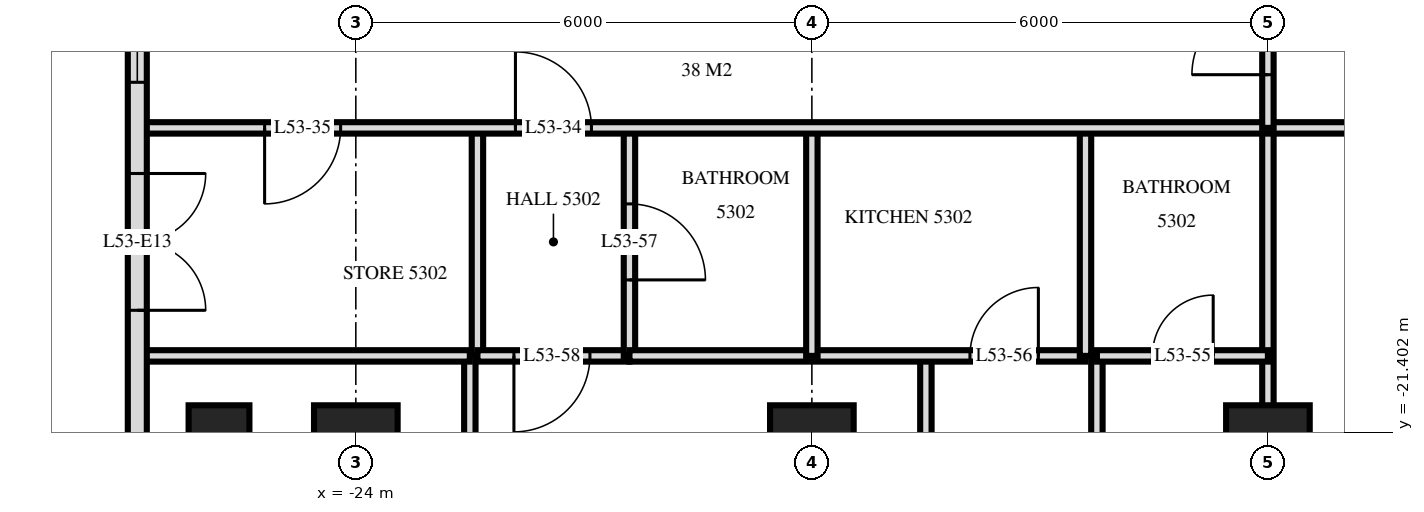
"""IFC4 building model, lengths in metres.
Left out: names, types, materials, properties, quantities, classifications, styles, units other than length and angle.
Written with IfcOpenShell. Run it as: python <this file> out.ifc"""

import sys

from ifc_helpers import new_model, si_unit, direction, frame, frame_2d, origin, origin_2d, place, context, subcontext, project, spatial, rectangle, extrude, element, fill, save


model = new_model("IFC4")
c1 = context("Model", 3, precision=1e-05, world=origin(), true_north=direction((0.0, 1.0)))
c2 = subcontext(c1, "Body", "Model", "MODEL_VIEW")
j1 = project(units=[si_unit("LENGTHUNIT", "METRE"), si_unit("PLANEANGLEUNIT", "RADIAN")], contexts=[c1])
p1 = place(None, origin())
s1 = spatial("IfcSite", under=j1, at=p1, CompositionType="ELEMENT")
p2 = place(p1, origin())
s2 = spatial("IfcBuilding", under=s1, at=p2, CompositionType="ELEMENT")
p3 = place(p2, frame((0.0, 0.0, 204.6)))
s3 = spatial("IfcBuildingStorey", under=s2, at=p3, CompositionType="ELEMENT", Elevation=204.6)
p4 = place(p3, frame((-25.8, -21.6, 0.0), z_axis=(0.0, 0.0, 1.0), x_axis=(0.0, 1.0, 0.0)))
e1 = element("IfcColumn", 1, at=p4, inside=s3, PredefinedType="COLUMN", context=c2, shape_type="SweptSolid", body=[
    extrude(rectangle(XDim=1.1, YDim=0.8, at=origin_2d()), origin(), (0.0, 0.0, 1.0), 3.5),
])
for number, where, z_axis, x_axis in (
    (2, (-24.0, -21.6, 0.0), (0.0, 0.0, 1.0), (1.0, 0.0, 0.0)),
    (3, (-18.0, -21.6, 0.0), (0.0, 0.0, 1.0), (1.0, 0.0, 0.0)),
    (4, (-12.0, -21.6, 0.0), (0.0, 0.0, 1.0), (1.0, 0.0, 0.0)),
):
    element("IfcColumn", number, at=place(p3, frame(where, z_axis=z_axis, x_axis=x_axis)), inside=s3, PredefinedType="COLUMN", context=c2, shape_type="SweptSolid", body=[
        extrude(rectangle(XDim=1.1, YDim=1.1, at=origin_2d()), origin(), (0.0, 0.0, 1.0), 3.5),
    ])
p5 = place(p3, frame((-26.875, -3.325, 0.0), z_axis=(0.0, 0.0, 1.0), x_axis=(0.0, -1.0, 0.0)))
e5 = element("IfcWall", 5, at=p5, inside=s3, PredefinedType="SOLIDWALL", context=c2, shape_type="SweptSolid", body=[
    extrude(rectangle(XDim=21.551, YDim=0.25, at=frame_2d((10.775, 0.0))), origin(), (0.0, 0.0, 1.0), 3.22),
])
p6 = place(p5, frame((6.65, 0.0, 0.0)))
e6 = element("IfcOpeningElement", 6, at=p6, cuts=e5, PredefinedType="OPENING", context=c2, shape_type="SweptSolid", body=[
    extrude(rectangle(XDim=1.8, YDim=2.4, at=frame_2d((0.9, 1.2))), frame((0.0, 0.135, 0.0), z_axis=(0.0, -1.0, 0.0), x_axis=(1.0, 0.0, 0.0)), (0.0, 0.0, 1.0), 0.27),
])
p7 = place(p5, frame((12.275, 0.0, 0.9)))
e7 = element("IfcOpeningElement", 7, at=p7, cuts=e5, PredefinedType="OPENING", context=c2, shape_type="SweptSolid", body=[
    extrude(rectangle(XDim=1.2, YDim=1.5, at=frame_2d((0.6, 0.75))), frame((0.0, 0.135, 0.0), z_axis=(0.0, -1.0, 0.0), x_axis=(1.0, 0.0, 0.0)), (0.0, 0.0, 1.0), 0.27),
])
p8 = place(p5, frame((14.675, 0.0, 0.0)))
e8 = element("IfcOpeningElement", 8, at=p8, cuts=e5, PredefinedType="OPENING", context=c2, shape_type="SweptSolid", body=[
    extrude(rectangle(XDim=1.8, YDim=2.4, at=frame_2d((0.9, 1.2))), frame((0.0, 0.135, 0.0), z_axis=(0.0, -1.0, 0.0), x_axis=(1.0, 0.0, 0.0)), (0.0, 0.0, 1.0), 0.27),
])
p9 = place(p5, frame((18.875, 0.0, 0.0)))
e9 = element("IfcOpeningElement", 9, at=p9, cuts=e5, PredefinedType="OPENING", context=c2, shape_type="SweptSolid", body=[
    extrude(rectangle(XDim=1.8, YDim=2.4, at=frame_2d((0.9, 1.2))), frame((0.0, 0.135, 0.0), z_axis=(0.0, -1.0, 0.0), x_axis=(1.0, 0.0, 0.0)), (0.0, 0.0, 1.0), 0.27),
])
p10 = place(p3, frame((-12.0, -17.4, 0.0), z_axis=(0.0, 0.0, 1.0), x_axis=(0.0, 1.0, 0.0)))
e10 = element("IfcWall", 10, at=p10, inside=s3, PredefinedType="PARTITIONING", context=c2, shape_type="SweptSolid", body=[
    extrude(rectangle(XDim=2.35, YDim=0.15, at=frame_2d((1.175, 0.0))), origin(), (0.0, 0.0, 1.0), 3.22),
])
p11 = place(p10, frame((0.7, 0.0, 0.0)))
e11 = element("IfcOpeningElement", 11, at=p11, cuts=e10, PredefinedType="OPENING", context=c2, shape_type="SweptSolid", body=[
    extrude(rectangle(XDim=1.0, YDim=2.1, at=frame_2d((0.5, 1.05))), frame((0.0, 0.085, 0.0), z_axis=(0.0, -1.0, 0.0), x_axis=(1.0, 0.0, 0.0)), (0.0, 0.0, 1.0), 0.17),
])
p12 = place(p3, frame((-12.0, -29.22, 0.0), z_axis=(0.0, 0.0, 1.0), x_axis=(0.0, 1.0, 0.0)))
e12 = element("IfcWall", 12, at=p12, inside=s3, PredefinedType="PARTITIONING", context=c2, shape_type="SweptSolid", body=[
    extrude(rectangle(XDim=11.82, YDim=0.15, at=frame_2d((5.91, 0.0))), origin(), (0.0, 0.0, 1.0), 3.22),
])
p13 = place(p3, frame((-14.25, -29.22, 0.0), z_axis=(0.0, 0.0, 1.0), x_axis=(0.0, 1.0, 0.0)))
e13 = element("IfcWall", 13, at=p13, inside=s3, PredefinedType="PARTITIONING", context=c2, shape_type="SweptSolid", body=[
    extrude(rectangle(XDim=8.82, YDim=0.15, at=frame_2d((4.41, 0.0))), origin(), (0.0, 0.0, 1.0), 3.22),
])
p14 = place(p13, frame((3.87, 0.0, 0.0)))
e14 = element("IfcOpeningElement", 14, at=p14, cuts=e13, PredefinedType="OPENING", context=c2, shape_type="SweptSolid", body=[
    extrude(rectangle(XDim=0.9, YDim=2.1, at=frame_2d((0.45, 1.05))), frame((0.0, 0.085, 0.0), z_axis=(0.0, -1.0, 0.0), x_axis=(1.0, 0.0, 0.0)), (0.0, 0.0, 1.0), 0.17),
])
p15 = place(p3, frame((-14.4, -20.4, 0.0), z_axis=(0.0, 0.0, 1.0), x_axis=(0.0, 1.0, 0.0)))
e15 = element("IfcWall", 15, at=p15, inside=s3, PredefinedType="PARTITIONING", context=c2, shape_type="SweptSolid", body=[
    extrude(rectangle(XDim=3.0, YDim=0.15, at=frame_2d((1.5, 0.0))), origin(), (0.0, 0.0, 1.0), 3.22),
])
p16 = place(p3, frame((-16.5, -29.22, 0.0), z_axis=(0.0, 0.0, 1.0), x_axis=(0.0, 1.0, 0.0)))
e16 = element("IfcWall", 16, at=p16, inside=s3, PredefinedType="PARTITIONING", context=c2, shape_type="SweptSolid", body=[
    extrude(rectangle(XDim=8.82, YDim=0.15, at=frame_2d((4.41, 0.0))), origin(), (0.0, 0.0, 1.0), 3.22),
])
p17 = place(p16, frame((3.85, 0.0, 0.0)))
e17 = element("IfcOpeningElement", 17, at=p17, cuts=e16, PredefinedType="OPENING", context=c2, shape_type="SweptSolid", body=[
    extrude(rectangle(XDim=0.9, YDim=2.1, at=frame_2d((0.45, 1.05))), frame((0.0, 0.085, 0.0), z_axis=(0.0, -1.0, 0.0), x_axis=(1.0, 0.0, 0.0)), (0.0, 0.0, 1.0), 0.17),
])
p18 = place(p3, frame((-18.0, -20.4, 0.0), z_axis=(0.0, 0.0, 1.0), x_axis=(0.0, 1.0, 0.0)))
e18 = element("IfcWall", 18, at=p18, inside=s3, PredefinedType="PARTITIONING", context=c2, shape_type="SweptSolid", body=[
    extrude(rectangle(XDim=3.0, YDim=0.15, at=frame_2d((1.5, 0.0))), origin(), (0.0, 0.0, 1.0), 3.22),
])
p19 = place(p3, frame((-20.4, -20.4, 0.0), z_axis=(0.0, 0.0, 1.0), x_axis=(0.0, 1.0, 0.0)))
e19 = element("IfcWall", 19, at=p19, inside=s3, PredefinedType="PARTITIONING", context=c2, shape_type="SweptSolid", body=[
    extrude(rectangle(XDim=3.0, YDim=0.15, at=frame_2d((1.5, 0.0))), origin(), (0.0, 0.0, 1.0), 3.22),
])
p20 = place(p19, frame((1.0, 0.0, 0.0)))
e20 = element("IfcOpeningElement", 20, at=p20, cuts=e19, PredefinedType="OPENING", context=c2, shape_type="SweptSolid", body=[
    extrude(rectangle(XDim=1.0, YDim=2.1, at=frame_2d((0.5, 1.05))), frame((0.0, 0.085, 0.0), z_axis=(0.0, -1.0, 0.0), x_axis=(1.0, 0.0, 0.0)), (0.0, 0.0, 1.0), 0.17),
])
p21 = place(p3, frame((-22.4, -20.4, 0.0), z_axis=(0.0, 0.0, 1.0), x_axis=(0.0, 1.0, 0.0)))
e21 = element("IfcWall", 21, at=p21, inside=s3, PredefinedType="PARTITIONING", context=c2, shape_type="SweptSolid", body=[
    extrude(rectangle(XDim=3.0, YDim=0.15, at=frame_2d((1.5, 0.0))), origin(), (0.0, 0.0, 1.0), 3.22),
])
p22 = place(p3, frame((-22.5, -29.217, 0.0), z_axis=(0.0, 0.0, 1.0), x_axis=(0.0, 1.0, 0.0)))
e22 = element("IfcWall", 22, at=p22, inside=s3, PredefinedType="PARTITIONING", context=c2, shape_type="SweptSolid", body=[
    extrude(rectangle(XDim=8.817, YDim=0.15, at=frame_2d((4.408, 0.0))), origin(), (0.0, 0.0, 1.0), 3.22),
])
p23 = place(p22, frame((3.886, 0.0, 0.0)))
e23 = element("IfcOpeningElement", 23, at=p23, cuts=e22, PredefinedType="OPENING", context=c2, shape_type="SweptSolid", body=[
    extrude(rectangle(XDim=0.9, YDim=2.1, at=frame_2d((0.45, 1.05))), frame((0.0, 0.085, 0.0), z_axis=(0.0, -1.0, 0.0), x_axis=(1.0, 0.0, 0.0)), (0.0, 0.0, 1.0), 0.17),
])
p24 = place(p3, frame((-22.4, -20.4, 0.0), z_axis=(0.0, 0.0, 1.0), x_axis=(1.0, 0.0, 0.0)))
e24 = element("IfcWall", 24, at=p24, inside=s3, PredefinedType="PARTITIONING", context=c2, shape_type="SweptSolid", body=[
    extrude(rectangle(XDim=2.0, YDim=0.15, at=frame_2d((1.0, 0.0))), origin(), (0.0, 0.0, 1.0), 3.22),
])
p25 = place(p24, frame((0.48, 0.0, 0.0)))
e25 = element("IfcOpeningElement", 25, at=p25, cuts=e24, PredefinedType="OPENING", context=c2, shape_type="SweptSolid", body=[
    extrude(rectangle(XDim=1.0, YDim=2.1, at=frame_2d((0.5, 1.05))), frame((0.0, 0.085, 0.0), z_axis=(0.0, -1.0, 0.0), x_axis=(1.0, 0.0, 0.0)), (0.0, 0.0, 1.0), 0.17),
])
p26 = place(p3, frame((-26.82, -20.4, 0.0), z_axis=(0.0, 0.0, 1.0), x_axis=(1.0, 0.0, 0.0)))
e26 = element("IfcWall", 26, at=p26, inside=s3, PredefinedType="PARTITIONING", context=c2, shape_type="SweptSolid", body=[
    extrude(rectangle(XDim=4.32, YDim=0.15, at=frame_2d((2.16, 0.0))), origin(), (0.0, 0.0, 1.0), 3.22),
])
p27 = place(p3, frame((-20.4, -20.4, 0.0), z_axis=(0.0, 0.0, 1.0), x_axis=(1.0, 0.0, 0.0)))
e27 = element("IfcWall", 27, at=p27, inside=s3, PredefinedType="PARTITIONING", context=c2, shape_type="SweptSolid", body=[
    extrude(rectangle(XDim=6.0, YDim=0.15, at=frame_2d((3.0, 0.0))), origin(), (0.0, 0.0, 1.0), 3.22),
])
p28 = place(p27, frame((4.48, 0.0, 0.0)))
e28 = element("IfcOpeningElement", 28, at=p28, cuts=e27, PredefinedType="OPENING", context=c2, shape_type="SweptSolid", body=[
    extrude(rectangle(XDim=0.9, YDim=2.1, at=frame_2d((0.45, 1.05))), frame((0.0, 0.085, 0.0), z_axis=(0.0, -1.0, 0.0), x_axis=(1.0, 0.0, 0.0)), (0.0, 0.0, 1.0), 0.17),
])
p29 = place(p3, frame((-14.25, -20.4, 0.0), z_axis=(0.0, 0.0, 1.0), x_axis=(1.0, 0.0, 0.0)))
e29 = element("IfcWall", 29, at=p29, inside=s3, PredefinedType="PARTITIONING", context=c2, shape_type="SweptSolid", body=[
    extrude(rectangle(XDim=2.25, YDim=0.15, at=frame_2d((1.125, 0.0))), origin(), (0.0, 0.0, 1.0), 3.22),
])
p30 = place(p29, frame((0.73, 0.0, 0.0)))
e30 = element("IfcOpeningElement", 30, at=p30, cuts=e29, PredefinedType="OPENING", context=c2, shape_type="SweptSolid", body=[
    extrude(rectangle(XDim=0.8, YDim=2.1, at=frame_2d((0.4, 1.05))), frame((0.0, 0.085, 0.0), z_axis=(0.0, -1.0, 0.0), x_axis=(1.0, 0.0, 0.0)), (0.0, 0.0, 1.0), 0.17),
])
p31 = place(p3, frame((-26.82, -17.4, 0.0), z_axis=(0.0, 0.0, 1.0), x_axis=(1.0, 0.0, 0.0)))
e31 = element("IfcWall", 31, at=p31, inside=s3, PredefinedType="PARTITIONING", context=c2, shape_type="SweptSolid", body=[
    extrude(rectangle(XDim=53.64, YDim=0.15, at=frame_2d((26.82, 0.0))), origin(), (0.0, 0.0, 1.0), 3.22),
])
p32 = place(p31, frame((4.92, 0.0, 0.0)))
e32 = element("IfcOpeningElement", 32, at=p32, cuts=e31, PredefinedType="OPENING", context=c2, shape_type="SweptSolid", body=[
    extrude(rectangle(XDim=1.0, YDim=2.1, at=frame_2d((0.5, 1.05))), frame((0.0, 0.085, 0.0), z_axis=(0.0, -1.0, 0.0), x_axis=(1.0, 0.0, 0.0)), (0.0, 0.0, 1.0), 0.17),
])
p33 = place(p31, frame((1.62, 0.0, 0.0)))
e33 = element("IfcOpeningElement", 33, at=p33, cuts=e31, PredefinedType="OPENING", context=c2, shape_type="SweptSolid", body=[
    extrude(rectangle(XDim=1.0, YDim=2.1, at=frame_2d((0.5, 1.05))), frame((0.0, 0.085, 0.0), z_axis=(0.0, -1.0, 0.0), x_axis=(1.0, 0.0, 0.0)), (0.0, 0.0, 1.0), 0.17),
])
p34 = place(p31, frame((41.17, 0.0, 0.0)))
e34 = element("IfcOpeningElement", 34, at=p34, cuts=e31, PredefinedType="OPENING", context=c2, shape_type="SweptSolid", body=[
    extrude(rectangle(XDim=1.0, YDim=2.1, at=frame_2d((0.5, 1.05))), frame((0.0, 0.085, 0.0), z_axis=(0.0, -1.0, 0.0), x_axis=(1.0, 0.0, 0.0)), (0.0, 0.0, 1.0), 0.17),
])
p35 = place(p31, frame((49.42, 0.0, 0.0)))
e35 = element("IfcOpeningElement", 35, at=p35, cuts=e31, PredefinedType="OPENING", context=c2, shape_type="SweptSolid", body=[
    extrude(rectangle(XDim=1.0, YDim=2.1, at=frame_2d((0.5, 1.05))), frame((0.0, 0.085, 0.0), z_axis=(0.0, -1.0, 0.0), x_axis=(1.0, 0.0, 0.0)), (0.0, 0.0, 1.0), 0.17),
])
p36 = place(p31, frame((47.62, 0.0, 0.0)))
e36 = element("IfcOpeningElement", 36, at=p36, cuts=e31, PredefinedType="OPENING", context=c2, shape_type="SweptSolid", body=[
    extrude(rectangle(XDim=1.0, YDim=2.1, at=frame_2d((0.5, 1.05))), frame((0.0, 0.085, 0.0), z_axis=(0.0, -1.0, 0.0), x_axis=(1.0, 0.0, 0.0)), (0.0, 0.0, 1.0), 0.17),
])
p37 = place(p31, frame((21.82, 0.0, 0.0)))
e37 = element("IfcOpeningElement", 37, at=p37, cuts=e31, PredefinedType="OPENING", context=c2, shape_type="SweptSolid", body=[
    extrude(rectangle(XDim=1.0, YDim=2.1, at=frame_2d((0.5, 1.05))), frame((0.0, 0.085, 0.0), z_axis=(0.0, -1.0, 0.0), x_axis=(1.0, 0.0, 0.0)), (0.0, 0.0, 1.0), 0.17),
])
p38 = place(p31, frame((33.82, 0.0, 0.0)))
e38 = element("IfcOpeningElement", 38, at=p38, cuts=e31, PredefinedType="OPENING", context=c2, shape_type="SweptSolid", body=[
    extrude(rectangle(XDim=1.0, YDim=2.1, at=frame_2d((0.5, 1.05))), frame((0.0, 0.085, 0.0), z_axis=(0.0, -1.0, 0.0), x_axis=(1.0, 0.0, 0.0)), (0.0, 0.0, 1.0), 0.17),
])
p39 = place(p7, origin())
e39 = element("IfcWindow", 39, at=p39, inside=s3, PartitioningType="SINGLE_PANEL", PredefinedType="WINDOW", context=c2, shape_type="SweptSolid", body=[
    extrude(rectangle(XDim=1.2, YDim=1.5, at=frame_2d((0.6, 0.75))), frame((0.0, 0.03, 0.0), z_axis=(0.0, -1.0, 0.0), x_axis=(1.0, 0.0, 0.0)), (0.0, 0.0, 1.0), 0.06),
])
fill(e7, e39)
p40 = place(p8, origin())
e40 = element("IfcDoor", 40, at=p40, inside=s3, OperationType="DOUBLE_DOOR_SINGLE_SWING", PredefinedType="DOOR", context=c2, shape_type="SweptSolid", body=[
    extrude(rectangle(XDim=1.8, YDim=2.4, at=frame_2d((0.9, 1.2))), frame((0.0, 0.025, 0.0), z_axis=(0.0, -1.0, 0.0), x_axis=(1.0, 0.0, 0.0)), (0.0, 0.0, 1.0), 0.05),
])
fill(e8, e40)
p41 = place(p11, origin())
e41 = element("IfcDoor", 41, at=p41, inside=s3, OperationType="SINGLE_SWING_RIGHT", PredefinedType="DOOR", context=c2, shape_type="SweptSolid", body=[
    extrude(rectangle(XDim=1.0, YDim=2.1, at=frame_2d((0.5, 1.05))), frame((0.0, 0.025, 0.0), z_axis=(0.0, -1.0, 0.0), x_axis=(1.0, 0.0, 0.0)), (0.0, 0.0, 1.0), 0.05),
])
fill(e11, e41)
p42 = place(p32, origin())
e42 = element("IfcDoor", 42, at=p42, inside=s3, OperationType="SINGLE_SWING_RIGHT", PredefinedType="DOOR", context=c2, shape_type="SweptSolid", body=[
    extrude(rectangle(XDim=1.0, YDim=2.1, at=frame_2d((0.5, 1.05))), frame((0.0, 0.025, 0.0), z_axis=(0.0, -1.0, 0.0), x_axis=(1.0, 0.0, 0.0)), (0.0, 0.0, 1.0), 0.05),
])
fill(e32, e42)
p43 = place(p33, frame((0.5, 0.0, 0.0), z_axis=(0.0, 0.0, 1.0), x_axis=(-1.0, 0.0, 0.0)))
e43 = element("IfcDoor", 43, at=p43, inside=s3, OperationType="SINGLE_SWING_LEFT", PredefinedType="DOOR", context=c2, shape_type="SweptSolid", body=[
    extrude(rectangle(XDim=1.0, YDim=2.1, at=frame_2d((0.0, 1.05))), frame((0.0, -0.025, 0.0), z_axis=(0.0, 1.0, 0.0), x_axis=(-1.0, 0.0, 0.0)), (0.0, 0.0, 1.0), 0.05),
])
fill(e33, e43)
p44 = place(p30, origin())
e44 = element("IfcDoor", 44, at=p44, inside=s3, OperationType="SINGLE_SWING_LEFT", PredefinedType="DOOR", context=c2, shape_type="SweptSolid", body=[
    extrude(rectangle(XDim=0.8, YDim=2.1, at=frame_2d((0.4, 1.05))), frame((0.0, 0.025, 0.0), z_axis=(0.0, -1.0, 0.0), x_axis=(1.0, 0.0, 0.0)), (0.0, 0.0, 1.0), 0.05),
])
fill(e30, e44)
p45 = place(p28, origin())
e45 = element("IfcDoor", 45, at=p45, inside=s3, OperationType="SINGLE_SWING_LEFT", PredefinedType="DOOR", context=c2, shape_type="SweptSolid", body=[
    extrude(rectangle(XDim=0.9, YDim=2.1, at=frame_2d((0.45, 1.05))), frame((0.0, 0.025, 0.0), z_axis=(0.0, -1.0, 0.0), x_axis=(1.0, 0.0, 0.0)), (0.0, 0.0, 1.0), 0.05),
])
fill(e28, e45)
p46 = place(p20, frame((0.5, 0.0, 0.0), z_axis=(0.0, 0.0, 1.0), x_axis=(-1.0, 0.0, 0.0)))
e46 = element("IfcDoor", 46, at=p46, inside=s3, OperationType="SINGLE_SWING_LEFT", PredefinedType="DOOR", context=c2, shape_type="SweptSolid", body=[
    extrude(rectangle(XDim=1.0, YDim=2.1, at=frame_2d((0.0, 1.05))), frame((0.0, -0.025, 0.0), z_axis=(0.0, 1.0, 0.0), x_axis=(-1.0, 0.0, 0.0)), (0.0, 0.0, 1.0), 0.05),
])
fill(e20, e46)
p47 = place(p25, frame((0.5, 0.0, 0.0), z_axis=(0.0, 0.0, 1.0), x_axis=(-1.0, 0.0, 0.0)))
e47 = element("IfcDoor", 47, at=p47, inside=s3, OperationType="SINGLE_SWING_LEFT", PredefinedType="DOOR", context=c2, shape_type="SweptSolid", body=[
    extrude(rectangle(XDim=1.0, YDim=2.1, at=frame_2d((0.0, 1.05))), frame((0.0, -0.025, 0.0), z_axis=(0.0, 1.0, 0.0), x_axis=(-1.0, 0.0, 0.0)), (0.0, 0.0, 1.0), 0.05),
])
fill(e25, e47)
save(model, sys.argv[1])
